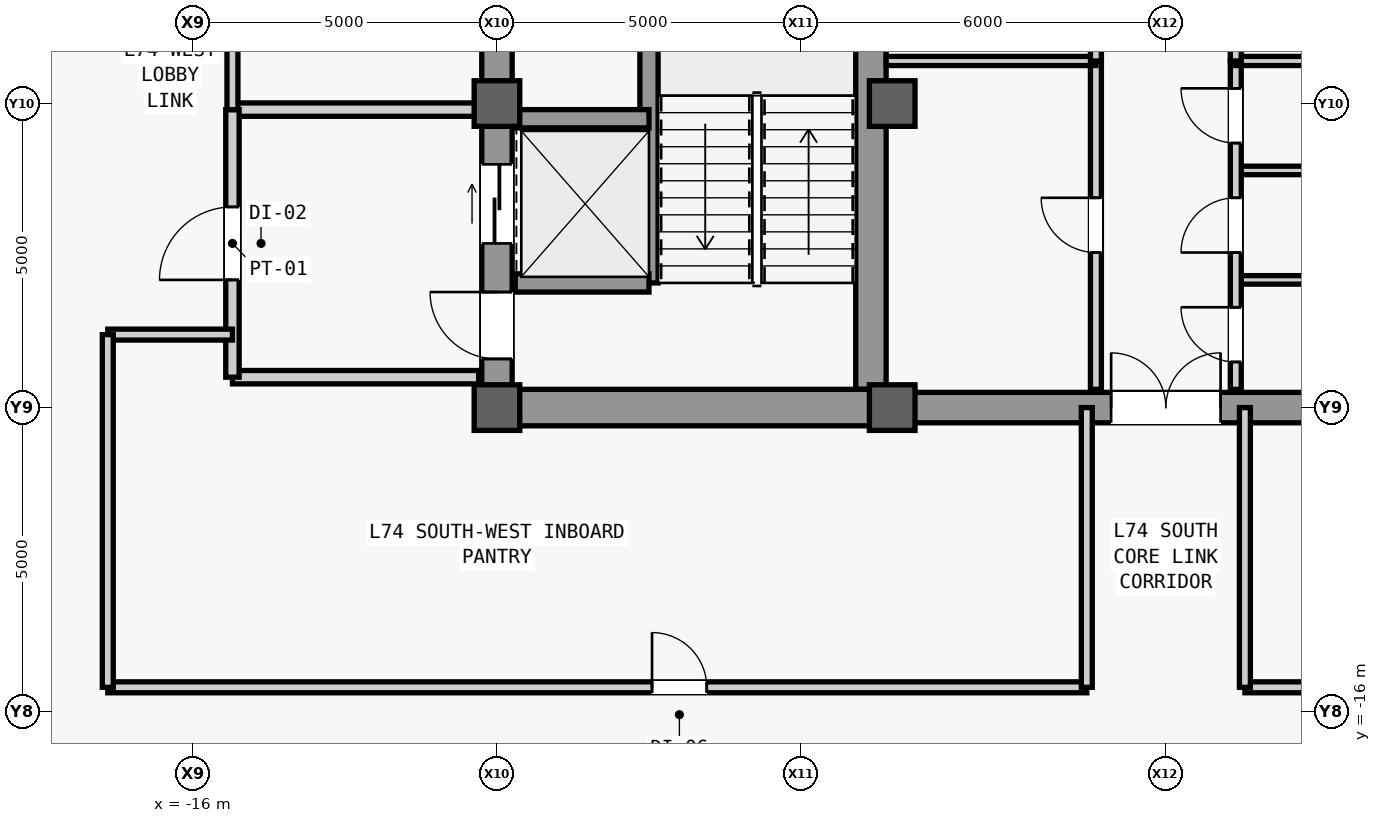
"""IFC4 building model, lengths in metres.
Left out: names, types, materials, properties, quantities, classifications, styles, units other than length and angle.
Written with IfcOpenShell. Run it as: python <this file> out.ifc"""

import sys

from ifc_helpers import new_model, si_unit, direction, frame, frame_2d, origin, origin_2d, place, context, subcontext, project, spatial, rectangle, extrude, source, transform, mapped, element, fill, save


model = new_model("IFC4")
c1 = context("Model", 3, precision=1e-05, world=origin(), true_north=direction((0.0, 1.0)))
c2 = subcontext(c1, "Body", "Model", "MODEL_VIEW")
j1 = project(units=[si_unit("LENGTHUNIT", "METRE"), si_unit("PLANEANGLEUNIT", "RADIAN")], contexts=[c1])
p1 = place(None, origin())
s1 = spatial("IfcSite", under=j1, at=p1, CompositionType="ELEMENT")
p2 = place(p1, origin())
s2 = spatial("IfcBuilding", under=s1, at=p2, CompositionType="ELEMENT")
p3 = place(p2, frame((0.0, 0.0, 313.5)))
s3 = spatial("IfcBuildingStorey", under=s2, at=p3, CompositionType="ELEMENT", Elevation=313.5)
m1 = source(origin(), c2, "Body", "SweptSolid", [
    extrude(rectangle(XDim=22.0, YDim=0.5, at=frame_2d((11.0, 0.0))), origin(), (0.0, 0.0, 1.0), 3.78),
])
p4 = place(p3, frame((-11.0, -11.0, 0.0), z_axis=(0.0, 0.0, 1.0), x_axis=(0.0, 1.0, 0.0)))
e1 = element("IfcWall", 1, at=p4, inside=s3, PredefinedType="SHEAR", context=c2, shape_type="MappedRepresentation", body=[
    mapped(m1, transform((0.0, 0.0, 0.0), scale=1.0)),
])
m2 = source(origin(), c2, "Body", "SweptSolid", [
    extrude(rectangle(XDim=1.1, YDim=2.2, at=frame_2d((0.55, 1.1))), frame((0.0, 0.26, 0.0), z_axis=(0.0, -1.0, 0.0), x_axis=(1.0, 0.0, 0.0)), (0.0, 0.0, 1.0), 0.52),
])
p5 = place(p4, frame((0.8, 0.0, 0.0)))
e2 = element("IfcOpeningElement", 2, at=p5, cuts=e1, PredefinedType="OPENING", context=c2, shape_type="MappedRepresentation", body=[
    mapped(m2, transform((0.0, 0.0, 0.0), scale=1.0)),
])
p6 = place(p4, frame((12.5, 0.0, 0.0)))
e3 = element("IfcOpeningElement", 3, at=p6, cuts=e1, PredefinedType="OPENING", context=c2, shape_type="MappedRepresentation", body=[
    mapped(m2, transform((0.0, 0.0, 0.0), scale=1.0)),
])
m3 = source(origin(), c2, "Body", "SweptSolid", [
    extrude(rectangle(XDim=0.9, YDim=2.15, at=frame_2d((0.45, 1.075))), frame((0.0, 0.26, 0.0), z_axis=(0.0, -1.0, 0.0), x_axis=(1.0, 0.0, 0.0)), (0.0, 0.0, 1.0), 0.52),
])
p7 = place(p4, frame((6.2, 0.0, 0.0)))
e4 = element("IfcOpeningElement", 4, at=p7, cuts=e1, PredefinedType="OPENING", context=c2, shape_type="MappedRepresentation", body=[
    mapped(m3, transform((0.0, 0.0, 0.0), scale=1.0)),
])
p8 = place(p4, frame((8.05, 0.0, 0.0)))
e5 = element("IfcOpeningElement", 5, at=p8, cuts=e1, PredefinedType="OPENING", context=c2, shape_type="MappedRepresentation", body=[
    mapped(m3, transform((0.0, 0.0, 0.0), scale=1.0)),
])
m4 = source(origin(), c2, "Body", "SweptSolid", [
    extrude(rectangle(XDim=1.2, YDim=2.3, at=frame_2d((0.6, 1.15))), frame((0.0, 0.26, 0.0), z_axis=(0.0, -1.0, 0.0), x_axis=(1.0, 0.0, 0.0)), (0.0, 0.0, 1.0), 0.52),
])
p9 = place(p4, frame((14.6, 0.0, 0.0)))
e6 = element("IfcOpeningElement", 6, at=p9, cuts=e1, PredefinedType="OPENING", context=c2, shape_type="MappedRepresentation", body=[
    mapped(m4, transform((0.0, 0.0, 0.0), scale=1.0)),
])
p10 = place(p4, frame((18.2, 0.0, 0.0)))
e7 = element("IfcOpeningElement", 7, at=p10, cuts=e1, PredefinedType="OPENING", context=c2, shape_type="MappedRepresentation", body=[
    mapped(m4, transform((0.0, 0.0, 0.0), scale=1.0)),
])
m5 = source(origin(), c2, "Body", "SweptSolid", [
    extrude(rectangle(XDim=1.3, YDim=2.3, at=frame_2d((0.65, 1.15))), frame((0.0, 0.26, 0.0), z_axis=(0.0, -1.0, 0.0), x_axis=(1.0, 0.0, 0.0)), (0.0, 0.0, 1.0), 0.52),
])
p11 = place(p4, frame((2.7, 0.0, 0.0)))
e8 = element("IfcOpeningElement", 8, at=p11, cuts=e1, PredefinedType="OPENING", context=c2, shape_type="MappedRepresentation", body=[
    mapped(m5, transform((0.0, 0.0, 0.0), scale=1.0)),
])
m6 = source(origin(), c2, "Body", "SweptSolid", [
    extrude(rectangle(XDim=21.4, YDim=0.5, at=frame_2d((10.7, 0.0))), origin(), (0.0, 0.0, 1.0), 3.78),
])
p12 = place(p3, frame((-4.85, -10.7, 0.0), z_axis=(0.0, 0.0, 1.0), x_axis=(0.0, 1.0, 0.0)))
e9 = element("IfcWall", 9, at=p12, inside=s3, PredefinedType="SHEAR", context=c2, shape_type="MappedRepresentation", body=[
    mapped(m6, transform((0.0, 0.0, 0.0), scale=1.0)),
])
m7 = source(origin(), c2, "Body", "SweptSolid", [
    extrude(rectangle(XDim=5.9, YDim=0.6, at=frame_2d((2.95, 0.0))), origin(), (0.0, 0.0, 1.0), 3.78),
])
p13 = place(p3, frame((-10.75, -11.0, 0.0), z_axis=(0.0, 0.0, 1.0), x_axis=(1.0, 0.0, 0.0)))
e10 = element("IfcWall", 10, at=p13, inside=s3, PredefinedType="SHEAR", context=c2, shape_type="MappedRepresentation", body=[
    mapped(m7, transform((0.0, 0.0, 0.0), scale=1.0)),
])
m8 = source(origin(), c2, "Body", "SweptSolid", [
    extrude(rectangle(XDim=9.2, YDim=0.5, at=frame_2d((4.6, 0.0))), origin(), (0.0, 0.0, 1.0), 3.78),
])
p14 = place(p3, frame((-4.6, -11.0, 0.0), z_axis=(0.0, 0.0, 1.0), x_axis=(1.0, 0.0, 0.0)))
e11 = element("IfcWall", 11, at=p14, inside=s3, PredefinedType="SHEAR", context=c2, shape_type="MappedRepresentation", body=[
    mapped(m8, transform((0.0, 0.0, 0.0), scale=1.0)),
])
m9 = source(origin(), c2, "Body", "SweptSolid", [
    extrude(rectangle(XDim=1.8, YDim=2.25, at=frame_2d((0.9, 1.125))), frame((0.0, 0.26, 0.0), z_axis=(0.0, -1.0, 0.0), x_axis=(1.0, 0.0, 0.0)), (0.0, 0.0, 1.0), 0.52),
])
p15 = place(p14, frame((3.7, 0.0, 0.0)))
e12 = element("IfcOpeningElement", 12, at=p15, cuts=e11, PredefinedType="OPENING", context=c2, shape_type="MappedRepresentation", body=[
    mapped(m9, transform((0.0, 0.0, 0.0), scale=1.0)),
])
m10 = source(origin(), c2, "Body", "SweptSolid", [
    extrude(rectangle(XDim=0.75, YDim=0.75, at=origin_2d()), origin(), (0.0, 0.0, 1.0), 4.0),
])
for number, where, z_axis, x_axis in (
    (13, (-11.0, -11.0, 0.0), (0.0, 0.0, 1.0), (1.0, 0.0, 0.0)),
    (14, (-11.0, -6.0, 0.0), (0.0, 0.0, 1.0), (1.0, 0.0, 0.0)),
    (15, (-4.5, -11.0, 0.0), (0.0, 0.0, 1.0), (1.0, 0.0, 0.0)),
    (16, (-4.5, -6.0, 0.0), (0.0, 0.0, 1.0), (1.0, 0.0, 0.0)),
):
    element("IfcColumn", number, at=place(p3, frame(where, z_axis=z_axis, x_axis=x_axis)), inside=s3, PredefinedType="COLUMN", context=c2, shape_type="MappedRepresentation", body=[
        mapped(m10, transform((0.0, 0.0, 0.0), scale=1.0)),
    ])
m11 = source(origin(), c2, "Body", "SweptSolid", [
    extrude(rectangle(XDim=7.8, YDim=0.3, at=frame_2d((3.9, 0.0))), origin(), (0.0, 0.0, 1.0), 3.78),
])
p16 = place(p3, frame((-8.5, -8.95, 0.0), z_axis=(0.0, 0.0, 1.0), x_axis=(0.0, 1.0, 0.0)))
e17 = element("IfcWall", 17, at=p16, inside=s3, PredefinedType="SHEAR", context=c2, shape_type="MappedRepresentation", body=[
    mapped(m11, transform((0.0, 0.0, 0.0), scale=1.0)),
])
m12 = source(origin(), c2, "Body", "SweptSolid", [
    extrude(rectangle(XDim=2.2, YDim=0.3, at=frame_2d((1.1, 0.0))), origin(), (0.0, 0.0, 1.0), 3.78),
])
for number, where, z_axis, x_axis in (
    (18, (-10.7, -8.95, 0.0), (0.0, 0.0, 1.0), (1.0, 0.0, 0.0)),
    (19, (-10.7, -6.25, 0.0), (0.0, 0.0, 1.0), (1.0, 0.0, 0.0)),
):
    element("IfcWall", number, at=place(p3, frame(where, z_axis=z_axis, x_axis=x_axis)), inside=s3, PredefinedType="SHEAR", context=c2, shape_type="MappedRepresentation", body=[
        mapped(m12, transform((0.0, 0.0, 0.0), scale=1.0)),
    ])
m13 = source(origin(), c2, "Body", "SweptSolid", [
    extrude(rectangle(XDim=4.05, YDim=0.22, at=frame_2d((2.025, 0.0))), origin(), (0.0, 0.0, 1.0), 3.78),
])
p17 = place(p3, frame((-15.35, -10.5, 0.0), z_axis=(0.0, 0.0, 1.0), x_axis=(1.0, 0.0, 0.0)))
e20 = element("IfcWall", 20, at=p17, inside=s3, PredefinedType="PARTITIONING", context=c2, shape_type="MappedRepresentation", body=[
    mapped(m13, transform((0.0, 0.0, 0.0), scale=1.0)),
])
m14 = source(origin(), c2, "Body", "SweptSolid", [
    extrude(rectangle(XDim=4.05, YDim=0.22, at=frame_2d((2.025, 0.0))), origin(), (0.0, 0.0, 1.0), 3.085),
])
p18 = place(p3, frame((-15.35, -6.1, 0.0), z_axis=(0.0, 0.0, 1.0), x_axis=(1.0, 0.0, 0.0)))
e21 = element("IfcWall", 21, at=p18, inside=s3, PredefinedType="PARTITIONING", context=c2, shape_type="MappedRepresentation", body=[
    mapped(m14, transform((0.0, 0.0, 0.0), scale=1.0)),
])
m15 = source(origin(), c2, "Body", "SweptSolid", [
    extrude(rectangle(XDim=4.4, YDim=0.22, at=frame_2d((2.2, 0.0))), origin(), (0.0, 0.0, 1.0), 3.78),
])
p19 = place(p3, frame((-15.35, -10.5, 0.0), z_axis=(0.0, 0.0, 1.0), x_axis=(0.0, 1.0, 0.0)))
e22 = element("IfcWall", 22, at=p19, inside=s3, PredefinedType="PARTITIONING", context=c2, shape_type="MappedRepresentation", body=[
    mapped(m15, transform((0.0, 0.0, 0.0), scale=1.0)),
])
m16 = source(origin(), c2, "Body", "SweptSolid", [
    extrude(rectangle(XDim=1.2, YDim=2.2, at=frame_2d((0.6, 1.1))), frame((0.0, 0.12, 0.0), z_axis=(0.0, -1.0, 0.0), x_axis=(1.0, 0.0, 0.0)), (0.0, 0.0, 1.0), 0.24),
])
p20 = place(p19, frame((1.6, 0.0, 0.0)))
e23 = element("IfcOpeningElement", 23, at=p20, cuts=e22, PredefinedType="OPENING", context=c2, shape_type="MappedRepresentation", body=[
    mapped(m16, transform((0.0, 0.0, 0.0), scale=1.0)),
])
m17 = source(origin(), c2, "Body", "SweptSolid", [
    extrude(rectangle(XDim=16.6, YDim=0.18, at=frame_2d((8.3, 0.0))), origin(), (0.0, 0.0, 1.0), 3.78),
])
p21 = place(p3, frame((-15.35, -6.1, 0.0), z_axis=(0.0, 0.0, 1.0), x_axis=(0.0, 1.0, 0.0)))
e24 = element("IfcWall", 24, at=p21, inside=s3, PredefinedType="PARTITIONING", context=c2, shape_type="MappedRepresentation", body=[
    mapped(m17, transform((0.0, 0.0, 0.0), scale=1.0)),
])
m18 = source(origin(), c2, "Body", "SweptSolid", [
    extrude(rectangle(XDim=1.8, YDim=2.25, at=frame_2d((0.9, 1.125))), frame((0.0, 0.1, 0.0), z_axis=(0.0, -1.0, 0.0), x_axis=(1.0, 0.0, 0.0)), (0.0, 0.0, 1.0), 0.2),
])
p22 = place(p21, frame((2.7, 0.0, 0.0)))
e25 = element("IfcOpeningElement", 25, at=p22, cuts=e24, PredefinedType="OPENING", context=c2, shape_type="MappedRepresentation", body=[
    mapped(m18, transform((0.0, 0.0, 0.0), scale=1.0)),
])
p23 = place(p21, frame((11.0, 0.0, 0.0)))
e26 = element("IfcOpeningElement", 26, at=p23, cuts=e24, PredefinedType="OPENING", context=c2, shape_type="MappedRepresentation", body=[
    mapped(m18, transform((0.0, 0.0, 0.0), scale=1.0)),
])
m19 = source(origin(), c2, "Body", "SweptSolid", [
    extrude(rectangle(XDim=5.4, YDim=0.18, at=frame_2d((2.7, 0.0))), origin(), (0.0, 0.0, 1.0), 3.78),
])
p24 = place(p3, frame((-1.15, -10.7, 0.0), z_axis=(0.0, 0.0, 1.0), x_axis=(0.0, 1.0, 0.0)))
e27 = element("IfcWall", 27, at=p24, inside=s3, PredefinedType="PARTITIONING", context=c2, shape_type="MappedRepresentation", body=[
    mapped(m19, transform((0.0, 0.0, 0.0), scale=1.0)),
])
m20 = source(origin(), c2, "Body", "SweptSolid", [
    extrude(rectangle(XDim=0.9, YDim=2.15, at=frame_2d((0.45, 1.075))), frame((0.0, 0.1, 0.0), z_axis=(0.0, -1.0, 0.0), x_axis=(1.0, 0.0, 0.0)), (0.0, 0.0, 1.0), 0.2),
])
p25 = place(p24, frame((2.25, 0.0, 0.0)))
e28 = element("IfcOpeningElement", 28, at=p25, cuts=e27, PredefinedType="OPENING", context=c2, shape_type="MappedRepresentation", body=[
    mapped(m20, transform((0.0, 0.0, 0.0), scale=1.0)),
])
m21 = source(origin(), c2, "Body", "SweptSolid", [
    extrude(rectangle(XDim=3.45, YDim=0.14, at=frame_2d((1.725, 0.0))), origin(), (0.0, 0.0, 1.0), 3.78),
])
for number, where, z_axis, x_axis in (
    (29, (1.15, -8.9, 0.0), (0.0, 0.0, 1.0), (1.0, 0.0, 0.0)),
    (30, (1.15, -7.1, 0.0), (0.0, 0.0, 1.0), (1.0, 0.0, 0.0)),
):
    element("IfcWall", number, at=place(p3, frame(where, z_axis=z_axis, x_axis=x_axis)), inside=s3, PredefinedType="PARTITIONING", context=c2, shape_type="MappedRepresentation", body=[
        mapped(m21, transform((0.0, 0.0, 0.0), scale=1.0)),
    ])
p26 = place(p3, frame((1.15, -10.7, 0.0), z_axis=(0.0, 0.0, 1.0), x_axis=(0.0, 1.0, 0.0)))
e31 = element("IfcWall", 31, at=p26, inside=s3, PredefinedType="PARTITIONING", context=c2, shape_type="MappedRepresentation", body=[
    mapped(m19, transform((0.0, 0.0, 0.0), scale=1.0)),
])
p27 = place(p26, frame((0.45, 0.0, 0.0)))
e32 = element("IfcOpeningElement", 32, at=p27, cuts=e31, PredefinedType="OPENING", context=c2, shape_type="MappedRepresentation", body=[
    mapped(m20, transform((0.0, 0.0, 0.0), scale=1.0)),
])
p28 = place(p26, frame((2.25, 0.0, 0.0)))
e33 = element("IfcOpeningElement", 33, at=p28, cuts=e31, PredefinedType="OPENING", context=c2, shape_type="MappedRepresentation", body=[
    mapped(m20, transform((0.0, 0.0, 0.0), scale=1.0)),
])
p29 = place(p26, frame((4.05, 0.0, 0.0)))
e34 = element("IfcOpeningElement", 34, at=p29, cuts=e31, PredefinedType="OPENING", context=c2, shape_type="MappedRepresentation", body=[
    mapped(m20, transform((0.0, 0.0, 0.0), scale=1.0)),
])
m22 = source(origin(), c2, "Body", "SweptSolid", [
    extrude(rectangle(XDim=3.45, YDim=0.15, at=frame_2d((1.725, 0.0))), origin(), (0.0, 0.0, 1.0), 3.78),
])
for number, where, z_axis, x_axis in (
    (35, (-4.6, -5.3, 0.0), (0.0, 0.0, 1.0), (1.0, 0.0, 0.0)),
    (36, (1.15, -5.3, 0.0), (0.0, 0.0, 1.0), (1.0, 0.0, 0.0)),
):
    element("IfcWall", number, at=place(p3, frame(where, z_axis=z_axis, x_axis=x_axis)), inside=s3, PredefinedType="PARTITIONING", context=c2, shape_type="MappedRepresentation", body=[
        mapped(m22, transform((0.0, 0.0, 0.0), scale=1.0)),
    ])
m23 = source(origin(), c2, "Body", "SweptSolid", [
    extrude(rectangle(XDim=10.6, YDim=0.18, at=frame_2d((5.3, 0.0))), origin(), (0.0, 0.0, 1.0), 3.78),
])
p30 = place(p3, frame((-1.15, -5.3, 0.0), z_axis=(0.0, 0.0, 1.0), x_axis=(0.0, 1.0, 0.0)))
e37 = element("IfcWall", 37, at=p30, inside=s3, PredefinedType="PARTITIONING", context=c2, shape_type="MappedRepresentation", body=[
    mapped(m23, transform((0.0, 0.0, 0.0), scale=1.0)),
])
p31 = place(p30, frame((4.2, 0.0, 0.0)))
e38 = element("IfcOpeningElement", 38, at=p31, cuts=e37, PredefinedType="OPENING", context=c2, shape_type="MappedRepresentation", body=[
    mapped(m20, transform((0.0, 0.0, 0.0), scale=1.0)),
])
p32 = place(p30, frame((9.475, 0.0, 0.0)))
e39 = element("IfcOpeningElement", 39, at=p32, cuts=e37, PredefinedType="OPENING", context=c2, shape_type="MappedRepresentation", body=[
    mapped(m20, transform((0.0, 0.0, 0.0), scale=1.0)),
])
p33 = place(p3, frame((1.15, -5.3, 0.0), z_axis=(0.0, 0.0, 1.0), x_axis=(0.0, 1.0, 0.0)))
e40 = element("IfcWall", 40, at=p33, inside=s3, PredefinedType="PARTITIONING", context=c2, shape_type="MappedRepresentation", body=[
    mapped(m23, transform((0.0, 0.0, 0.0), scale=1.0)),
])
p34 = place(p33, frame((1.15, 0.0, 0.0)))
e41 = element("IfcOpeningElement", 41, at=p34, cuts=e40, PredefinedType="OPENING", context=c2, shape_type="MappedRepresentation", body=[
    mapped(m20, transform((0.0, 0.0, 0.0), scale=1.0)),
])
p35 = place(p33, frame((4.6, 0.0, 0.0)))
e42 = element("IfcOpeningElement", 42, at=p35, cuts=e40, PredefinedType="OPENING", context=c2, shape_type="MappedRepresentation", body=[
    mapped(m20, transform((0.0, 0.0, 0.0), scale=1.0)),
])
p36 = place(p33, frame((7.65, 0.0, 0.0)))
e43 = element("IfcOpeningElement", 43, at=p36, cuts=e40, PredefinedType="OPENING", context=c2, shape_type="MappedRepresentation", body=[
    mapped(m20, transform((0.0, 0.0, 0.0), scale=1.0)),
])
p37 = place(p33, frame((9.475, 0.0, 0.0)))
e44 = element("IfcOpeningElement", 44, at=p37, cuts=e40, PredefinedType="OPENING", context=c2, shape_type="MappedRepresentation", body=[
    mapped(m20, transform((0.0, 0.0, 0.0), scale=1.0)),
])
m24 = source(origin(), c2, "Body", "SweptSolid", [
    extrude(rectangle(XDim=2.05, YDim=0.18, at=frame_2d((1.025, 0.0))), origin(), (0.0, 0.0, 1.0), 3.78),
])
p38 = place(p3, frame((-17.4, -9.8, 0.0), z_axis=(0.0, 0.0, 1.0), x_axis=(1.0, 0.0, 0.0)))
e45 = element("IfcWall", 45, at=p38, inside=s3, PredefinedType="PARTITIONING", context=c2, shape_type="MappedRepresentation", body=[
    mapped(m24, transform((0.0, 0.0, 0.0), scale=1.0)),
])
m25 = source(origin(), c2, "Body", "SweptSolid", [
    extrude(rectangle(XDim=16.1, YDim=0.18, at=frame_2d((8.05, 0.0))), origin(), (0.0, 0.0, 1.0), 3.78),
])
p39 = place(p3, frame((-17.4, -15.6, 0.0), z_axis=(0.0, 0.0, 1.0), x_axis=(1.0, 0.0, 0.0)))
e46 = element("IfcWall", 46, at=p39, inside=s3, PredefinedType="PARTITIONING", context=c2, shape_type="MappedRepresentation", body=[
    mapped(m25, transform((0.0, 0.0, 0.0), scale=1.0)),
])
p40 = place(p39, frame((8.95, 0.0, 0.0)))
e47 = element("IfcOpeningElement", 47, at=p40, cuts=e46, PredefinedType="OPENING", context=c2, shape_type="MappedRepresentation", body=[
    mapped(m20, transform((0.0, 0.0, 0.0), scale=1.0)),
])
m26 = source(origin(), c2, "Body", "SweptSolid", [
    extrude(rectangle(XDim=5.8, YDim=0.18, at=frame_2d((2.9, 0.0))), origin(), (0.0, 0.0, 1.0), 3.78),
])
p41 = place(p3, frame((-17.4, -15.6, 0.0), z_axis=(0.0, 0.0, 1.0), x_axis=(0.0, 1.0, 0.0)))
e48 = element("IfcWall", 48, at=p41, inside=s3, PredefinedType="PARTITIONING", context=c2, shape_type="MappedRepresentation", body=[
    mapped(m26, transform((0.0, 0.0, 0.0), scale=1.0)),
])
m27 = source(origin(), c2, "Body", "SweptSolid", [
    extrude(rectangle(XDim=4.6, YDim=0.18, at=frame_2d((2.3, 0.0))), origin(), (0.0, 0.0, 1.0), 3.78),
])
p42 = place(p3, frame((-1.3, -15.6, 0.0), z_axis=(0.0, 0.0, 1.0), x_axis=(0.0, 1.0, 0.0)))
e49 = element("IfcWall", 49, at=p42, inside=s3, PredefinedType="PARTITIONING", context=c2, shape_type="MappedRepresentation", body=[
    mapped(m27, transform((0.0, 0.0, 0.0), scale=1.0)),
])
m28 = source(origin(), c2, "Body", "SweptSolid", [
    extrude(rectangle(XDim=14.05, YDim=0.18, at=frame_2d((7.025, 0.0))), origin(), (0.0, 0.0, 1.0), 3.78),
])
p43 = place(p3, frame((1.3, -15.6, 0.0), z_axis=(0.0, 0.0, 1.0), x_axis=(1.0, 0.0, 0.0)))
e50 = element("IfcWall", 50, at=p43, inside=s3, PredefinedType="PARTITIONING", context=c2, shape_type="MappedRepresentation", body=[
    mapped(m28, transform((0.0, 0.0, 0.0), scale=1.0)),
])
p44 = place(p43, frame((6.25, 0.0, 0.0)))
e51 = element("IfcOpeningElement", 51, at=p44, cuts=e50, PredefinedType="OPENING", context=c2, shape_type="MappedRepresentation", body=[
    mapped(m20, transform((0.0, 0.0, 0.0), scale=1.0)),
])
p45 = place(p3, frame((1.3, -15.6, 0.0), z_axis=(0.0, 0.0, 1.0), x_axis=(0.0, 1.0, 0.0)))
e52 = element("IfcWall", 52, at=p45, inside=s3, PredefinedType="PARTITIONING", context=c2, shape_type="MappedRepresentation", body=[
    mapped(m27, transform((0.0, 0.0, 0.0), scale=1.0)),
])
m29 = source(origin(), c2, "Body", "SweptSolid", [
    extrude(rectangle(XDim=1.1, YDim=2.2, at=frame_2d((0.55, 1.1))), frame((0.0, 0.025, 0.0), z_axis=(0.0, -1.0, 0.0), x_axis=(1.0, 0.0, 0.0)), (0.0, 0.0, 1.0), 0.05),
])
p46 = place(p5, origin())
e53 = element("IfcDoor", 53, at=p46, inside=s3, OperationType="SINGLE_SWING_RIGHT", PredefinedType="DOOR", context=c2, shape_type="MappedRepresentation", body=[
    mapped(m29, transform((0.0, 0.0, 0.0), scale=1.0)),
])
fill(e2, e53)
m30 = source(origin(), c2, "Body", "SweptSolid", [
    extrude(rectangle(XDim=1.2, YDim=2.2, at=frame_2d((0.6, 1.1))), frame((0.0, 0.025, 0.0), z_axis=(0.0, -1.0, 0.0), x_axis=(1.0, 0.0, 0.0)), (0.0, 0.0, 1.0), 0.05),
])
p47 = place(p20, origin())
e54 = element("IfcDoor", 54, at=p47, inside=s3, OperationType="SINGLE_SWING_LEFT", PredefinedType="DOOR", context=c2, shape_type="MappedRepresentation", body=[
    mapped(m30, transform((0.0, 0.0, 0.0), scale=1.0)),
])
fill(e23, e54)
m31 = source(origin(), c2, "Body", "SweptSolid", [
    extrude(rectangle(XDim=0.9, YDim=2.15, at=frame_2d((0.45, 1.075))), frame((0.0, 0.025, 0.0), z_axis=(0.0, -1.0, 0.0), x_axis=(1.0, 0.0, 0.0)), (0.0, 0.0, 1.0), 0.05),
])
p48 = place(p25, origin())
e55 = element("IfcDoor", 55, at=p48, inside=s3, OperationType="SINGLE_SWING_RIGHT", PredefinedType="DOOR", context=c2, shape_type="MappedRepresentation", body=[
    mapped(m31, transform((0.0, 0.0, 0.0), scale=1.0)),
])
fill(e28, e55)
p49 = place(p27, origin())
e56 = element("IfcDoor", 56, at=p49, inside=s3, OperationType="SINGLE_SWING_RIGHT", PredefinedType="DOOR", context=c2, shape_type="MappedRepresentation", body=[
    mapped(m31, transform((0.0, 0.0, 0.0), scale=1.0)),
])
fill(e32, e56)
p50 = place(p28, origin())
e57 = element("IfcDoor", 57, at=p50, inside=s3, OperationType="SINGLE_SWING_LEFT", PredefinedType="DOOR", context=c2, shape_type="MappedRepresentation", body=[
    mapped(m31, transform((0.0, 0.0, 0.0), scale=1.0)),
])
fill(e33, e57)
p51 = place(p29, origin())
e58 = element("IfcDoor", 58, at=p51, inside=s3, OperationType="SINGLE_SWING_RIGHT", PredefinedType="DOOR", context=c2, shape_type="MappedRepresentation", body=[
    mapped(m31, transform((0.0, 0.0, 0.0), scale=1.0)),
])
fill(e34, e58)
m32 = source(origin(), c2, "Body", "SweptSolid", [
    extrude(rectangle(XDim=1.8, YDim=2.25, at=frame_2d((0.9, 1.125))), frame((0.0, 0.025, 0.0), z_axis=(0.0, -1.0, 0.0), x_axis=(1.0, 0.0, 0.0)), (0.0, 0.0, 1.0), 0.05),
])
p52 = place(p15, origin())
e59 = element("IfcDoor", 59, at=p52, inside=s3, OperationType="SINGLE_SWING_LEFT", PredefinedType="DOOR", context=c2, shape_type="MappedRepresentation", body=[
    mapped(m32, transform((0.0, 0.0, 0.0), scale=1.0)),
])
fill(e12, e59)
p53 = place(p40, origin())
e60 = element("IfcDoor", 60, at=p53, inside=s3, OperationType="SINGLE_SWING_LEFT", PredefinedType="DOOR", context=c2, shape_type="MappedRepresentation", body=[
    mapped(m31, transform((0.0, 0.0, 0.0), scale=1.0)),
])
fill(e47, e60)
m33 = source(origin(), c2, "Body", "SweptSolid", [
    extrude(rectangle(XDim=1.3, YDim=2.3, at=frame_2d((0.65, 1.15))), frame((0.0, 0.025, 0.0), z_axis=(0.0, -1.0, 0.0), x_axis=(1.0, 0.0, 0.0)), (0.0, 0.0, 1.0), 0.05),
])
p54 = place(p11, origin())
e61 = element("IfcDoor", 61, at=p54, inside=s3, OperationType="SLIDING_TO_LEFT", PredefinedType="DOOR", context=c2, shape_type="MappedRepresentation", body=[
    mapped(m33, transform((0.0, 0.0, 0.0), scale=1.0)),
])
fill(e8, e61)
save(model, sys.argv[1])
